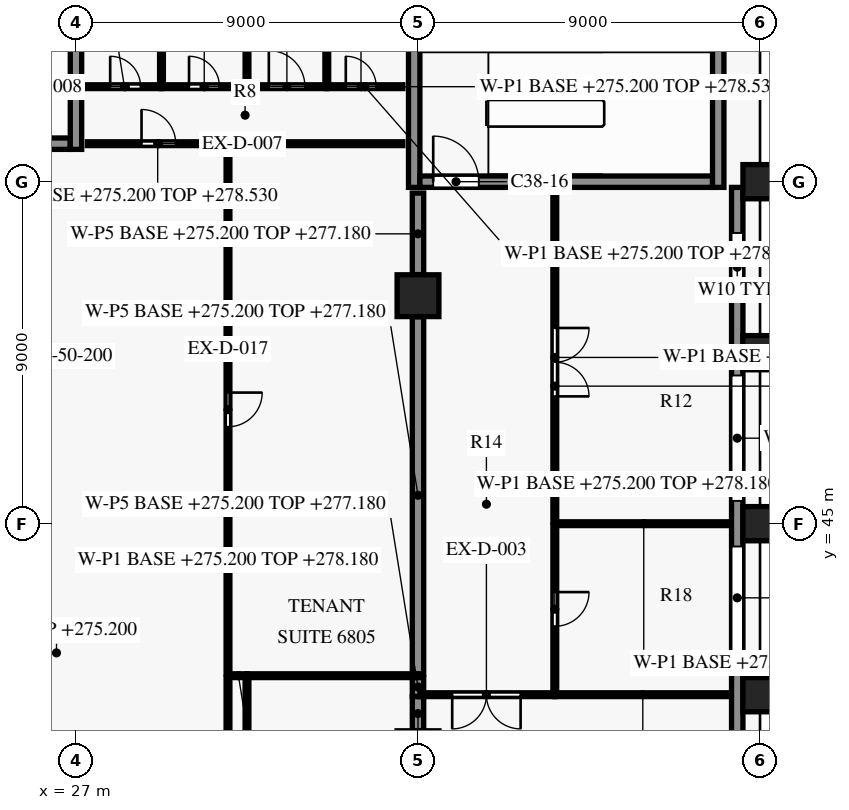
"""IFC4 building model, lengths in metres.
Left out: names, types, materials, properties, quantities, classifications, styles, units other than length and angle.
Written with IfcOpenShell. Run it as: python <this file> out.ifc"""

import sys

from ifc_helpers import new_model, si_unit, direction, frame, frame_2d, origin, origin_2d, place, context, subcontext, project, spatial, rectangle, extrude, element, fill, save


model = new_model("IFC4")
c1 = context("Model", 3, precision=1e-05, world=origin(), true_north=direction((0.0, 1.0)))
c2 = subcontext(c1, "Body", "Model", "MODEL_VIEW")
j1 = project(units=[si_unit("LENGTHUNIT", "METRE"), si_unit("PLANEANGLEUNIT", "RADIAN")], contexts=[c1])
p1 = place(None, origin())
s1 = spatial("IfcSite", under=j1, at=p1, CompositionType="ELEMENT")
p2 = place(p1, origin())
s2 = spatial("IfcBuilding", under=s1, at=p2, CompositionType="ELEMENT")
p3 = place(p2, frame((0.0, 0.0, 275.2)))
s3 = spatial("IfcBuildingStorey", under=s2, at=p3, CompositionType="ELEMENT", Elevation=275.2)
for number, where, z_axis, x_axis in (
    (1, (45.0, 40.5, 0.0), (0.0, 0.0, 1.0), (0.0, 1.0, 0.0)),
    (2, (45.0, 45.0, 0.0), (0.0, 0.0, 1.0), (0.0, 1.0, 0.0)),
    (3, (45.0, 49.5, 0.0), (0.0, 0.0, 1.0), (0.0, 1.0, 0.0)),
    (4, (45.0, 54.0, 0.0), (0.0, 0.0, 1.0), (0.0, 1.0, 0.0)),
):
    element("IfcColumn", number, at=place(p3, frame(where, z_axis=z_axis, x_axis=x_axis)), inside=s3, PredefinedType="COLUMN", context=c2, shape_type="SweptSolid", body=[
        extrude(rectangle(XDim=0.9, YDim=0.9, at=origin_2d()), origin(), (0.0, 0.0, 1.0), 3.8),
    ])
p4 = place(p3, frame((36.0, 51.0, 0.0), z_axis=(0.0, 0.0, 1.0), x_axis=(1.0, 0.0, 0.0)))
e5 = element("IfcColumn", 5, at=p4, inside=s3, PredefinedType="COLUMN", context=c2, shape_type="SweptSolid", body=[
    extrude(rectangle(XDim=1.1, YDim=1.1, at=origin_2d()), origin(), (0.0, 0.0, 1.0), 3.8),
])
p5 = place(p3, frame((44.4, 53.85, 0.0), z_axis=(0.0, 0.0, 1.0), x_axis=(0.0, -1.0, 0.0)))
e6 = element("IfcWall", 6, at=p5, inside=s3, PredefinedType="SOLIDWALL", context=c2, shape_type="SweptSolid", body=[
    extrude(rectangle(XDim=21.602, YDim=0.3, at=frame_2d((10.801, 0.0))), origin(), (0.0, 0.0, 1.0), 3.0),
])
p6 = place(p5, frame((1.2, 0.0, 0.75)))
e7 = element("IfcOpeningElement", 7, at=p6, cuts=e6, PredefinedType="OPENING", context=c2, shape_type="SweptSolid", body=[
    extrude(rectangle(XDim=1.8, YDim=1.8, at=frame_2d((0.9, 0.9))), frame((0.0, 0.16, 0.0), z_axis=(0.0, -1.0, 0.0), x_axis=(1.0, 0.0, 0.0)), (0.0, 0.0, 1.0), 0.32),
])
p7 = place(p5, frame((4.95, 0.0, 0.15)))
e8 = element("IfcOpeningElement", 8, at=p7, cuts=e6, PredefinedType="OPENING", context=c2, shape_type="SweptSolid", body=[
    extrude(rectangle(XDim=3.3, YDim=2.4, at=frame_2d((1.65, 1.2))), frame((0.0, 0.16, 0.0), z_axis=(0.0, -1.0, 0.0), x_axis=(1.0, 0.0, 0.0)), (0.0, 0.0, 1.0), 0.32),
])
p8 = place(p5, frame((9.45, 0.0, 0.15)))
e9 = element("IfcOpeningElement", 9, at=p8, cuts=e6, PredefinedType="OPENING", context=c2, shape_type="SweptSolid", body=[
    extrude(rectangle(XDim=3.3, YDim=2.4, at=frame_2d((1.65, 1.2))), frame((0.0, 0.16, 0.0), z_axis=(0.0, -1.0, 0.0), x_axis=(1.0, 0.0, 0.0)), (0.0, 0.0, 1.0), 0.32),
])
p9 = place(p5, frame((14.7, 0.0, 0.75)))
e10 = element("IfcOpeningElement", 10, at=p9, cuts=e6, PredefinedType="OPENING", context=c2, shape_type="SweptSolid", body=[
    extrude(rectangle(XDim=1.8, YDim=1.8, at=frame_2d((0.9, 0.9))), frame((0.0, 0.16, 0.0), z_axis=(0.0, -1.0, 0.0), x_axis=(1.0, 0.0, 0.0)), (0.0, 0.0, 1.0), 0.32),
])
p10 = place(p5, frame((19.2, 0.0, 0.75)))
e11 = element("IfcOpeningElement", 11, at=p10, cuts=e6, PredefinedType="OPENING", context=c2, shape_type="SweptSolid", body=[
    extrude(rectangle(XDim=1.8, YDim=1.8, at=frame_2d((0.9, 0.9))), frame((0.0, 0.16, 0.0), z_axis=(0.0, -1.0, 0.0), x_axis=(1.0, 0.0, 0.0)), (0.0, 0.0, 1.0), 0.32),
])
p11 = place(p3, frame((36.05, 54.0, 0.0), z_axis=(0.0, 0.0, 1.0), x_axis=(1.0, 0.0, 0.0)))
e12 = element("IfcWall", 12, at=p11, inside=s3, PredefinedType="SHEAR", context=c2, shape_type="SweptSolid", body=[
    extrude(rectangle(XDim=7.7, YDim=0.3, at=frame_2d((3.85, 0.0))), origin(), (0.0, 0.0, 1.0), 3.5),
])
p12 = place(p11, frame((0.35, 0.0, 0.0)))
e13 = element("IfcOpeningElement", 13, at=p12, cuts=e12, PredefinedType="OPENING", context=c2, shape_type="SweptSolid", body=[
    extrude(rectangle(XDim=1.2, YDim=2.2, at=frame_2d((0.6, 1.1))), frame((0.0, 0.16, 0.0), z_axis=(0.0, -1.0, 0.0), x_axis=(1.0, 0.0, 0.0)), (0.0, 0.0, 1.0), 0.32),
])
p13 = place(p3, frame((23.4, 55.0, 0.0), z_axis=(0.0, 0.0, 1.0), x_axis=(1.0, 0.0, 0.0)))
e14 = element("IfcWall", 14, at=p13, inside=s3, PredefinedType="SHEAR", context=c2, shape_type="SweptSolid", body=[
    extrude(rectangle(XDim=3.45, YDim=0.3, at=frame_2d((1.725, 0.0))), origin(), (0.0, 0.0, 1.0), 3.5),
])
p14 = place(p3, frame((27.0, 54.85, 0.0), z_axis=(0.0, 0.0, 1.0), x_axis=(0.0, 1.0, 0.0)))
e15 = element("IfcWall", 15, at=p14, inside=s3, PredefinedType="SHEAR", context=c2, shape_type="SweptSolid", body=[
    extrude(rectangle(XDim=8.6, YDim=0.3, at=frame_2d((4.3, 0.0))), origin(), (0.0, 0.0, 1.0), 3.5),
])
p15 = place(p14, frame((6.55, 0.0, 0.0)))
e16 = element("IfcOpeningElement", 16, at=p15, cuts=e15, PredefinedType="OPENING", context=c2, shape_type="SweptSolid", body=[
    extrude(rectangle(XDim=1.2, YDim=2.2, at=frame_2d((0.6, 1.1))), frame((0.0, 0.16, 0.0), z_axis=(0.0, -1.0, 0.0), x_axis=(1.0, 0.0, 0.0)), (0.0, 0.0, 1.0), 0.32),
])
for number, where, z_axis, x_axis in (
    (17, (35.9, 53.85, 0.0), (0.0, 0.0, 1.0), (0.0, 1.0, 0.0)),
    (18, (43.9, 53.85, 0.0), (0.0, 0.0, 1.0), (0.0, 1.0, 0.0)),
):
    element("IfcWall", number, at=place(p3, frame(where, z_axis=z_axis, x_axis=x_axis)), inside=s3, PredefinedType="SHEAR", context=c2, shape_type="SweptSolid", body=[
        extrude(rectangle(XDim=3.9, YDim=0.3, at=frame_2d((1.95, 0.0))), origin(), (0.0, 0.0, 1.0), 3.5),
    ])
p16 = place(p3, frame((36.0, 39.555, 0.0), z_axis=(0.0, 0.0, 1.0), x_axis=(0.0, 1.0, 0.0)))
e19 = element("IfcWall", 19, at=p16, inside=s3, PredefinedType="PARTITIONING", context=c2, shape_type="SweptSolid", body=[
    extrude(rectangle(XDim=0.895, YDim=0.3, at=frame_2d((0.448, 0.0))), origin(), (0.0, 0.0, 1.0), 1.98),
])
p17 = place(p3, frame((39.6, 40.5, 0.0), z_axis=(0.0, 0.0, 1.0), x_axis=(-1.0, 0.0, 0.0)))
e20 = element("IfcWall", 20, at=p17, inside=s3, PredefinedType="PARTITIONING", context=c2, shape_type="SweptSolid", body=[
    extrude(rectangle(XDim=3.55, YDim=0.1, at=frame_2d((1.775, 0.0))), origin(), (0.0, 0.0, 1.0), 1.98),
])
p18 = place(p17, frame((0.9, 0.0, 0.0)))
e21 = element("IfcOpeningElement", 21, at=p18, cuts=e20, PredefinedType="OPENING", context=c2, shape_type="SweptSolid", body=[
    extrude(rectangle(XDim=1.8, YDim=2.1, at=frame_2d((0.9, 1.05))), frame((0.0, 0.06, 0.0), z_axis=(0.0, -1.0, 0.0), x_axis=(1.0, 0.0, 0.0)), (0.0, 0.0, 1.0), 0.12),
])
p19 = place(p3, frame((44.23, 40.5, 0.0), z_axis=(0.0, 0.0, 1.0), x_axis=(-1.0, 0.0, 0.0)))
e22 = element("IfcWall", 22, at=p19, inside=s3, PredefinedType="PARTITIONING", context=c2, shape_type="SweptSolid", body=[
    extrude(rectangle(XDim=4.63, YDim=0.1, at=frame_2d((2.315, 0.0))), origin(), (0.0, 0.0, 1.0), 3.33),
])
p20 = place(p3, frame((36.0, 40.455, 0.0), z_axis=(0.0, 0.0, 1.0), x_axis=(0.0, 1.0, 0.0)))
e23 = element("IfcWall", 23, at=p20, inside=s3, PredefinedType="PARTITIONING", context=c2, shape_type="SweptSolid", body=[
    extrude(rectangle(XDim=0.495, YDim=0.3, at=frame_2d((0.248, 0.0))), origin(), (0.0, 0.0, 1.0), 1.98),
])
p21 = place(p3, frame((31.0, 40.95, 0.0), z_axis=(0.0, 0.0, 1.0), x_axis=(0.0, -1.0, 0.0)))
e24 = element("IfcWall", 24, at=p21, inside=s3, PredefinedType="PARTITIONING", context=c2, shape_type="SweptSolid", body=[
    extrude(rectangle(XDim=7.4, YDim=0.1, at=frame_2d((3.7, 0.0))), origin(), (0.0, 0.0, 1.0), 2.98),
])
p22 = place(p3, frame((31.5, 40.95, 0.0), z_axis=(0.0, 0.0, 1.0), x_axis=(0.0, -1.0, 0.0)))
e25 = element("IfcWall", 25, at=p22, inside=s3, PredefinedType="PARTITIONING", context=c2, shape_type="SweptSolid", body=[
    extrude(rectangle(XDim=13.78, YDim=0.1, at=frame_2d((6.89, 0.0))), origin(), (0.0, 0.0, 1.0), 1.98),
])
p23 = place(p22, frame((6.5, 0.0, 0.0)))
e26 = element("IfcOpeningElement", 26, at=p23, cuts=e25, PredefinedType="OPENING", context=c2, shape_type="SweptSolid", body=[
    extrude(rectangle(XDim=0.9, YDim=2.1, at=frame_2d((0.45, 1.05))), frame((0.0, 0.06, 0.0), z_axis=(0.0, -1.0, 0.0), x_axis=(1.0, 0.0, 0.0)), (0.0, 0.0, 1.0), 0.12),
])
p24 = place(p3, frame((31.05, 41.0, 0.0), z_axis=(0.0, 0.0, 1.0), x_axis=(1.0, 0.0, 0.0)))
e27 = element("IfcWall", 27, at=p24, inside=s3, PredefinedType="PARTITIONING", context=c2, shape_type="SweptSolid", body=[
    extrude(rectangle(XDim=0.45, YDim=0.1, at=frame_2d((0.225, 0.0))), origin(), (0.0, 0.0, 1.0), 3.33),
])
p25 = place(p3, frame((35.95, 41.0, 0.0), z_axis=(0.0, 0.0, 1.0), x_axis=(-1.0, 0.0, 0.0)))
e28 = element("IfcWall", 28, at=p25, inside=s3, PredefinedType="PARTITIONING", context=c2, shape_type="SweptSolid", body=[
    extrude(rectangle(XDim=4.45, YDim=0.1, at=frame_2d((2.225, 0.0))), origin(), (0.0, 0.0, 1.0), 1.98),
])
p26 = place(p3, frame((36.0, 41.05, 0.0), z_axis=(0.0, 0.0, 1.0), x_axis=(0.0, 1.0, 0.0)))
e29 = element("IfcWall", 29, at=p26, inside=s3, PredefinedType="PARTITIONING", context=c2, shape_type="SweptSolid", body=[
    extrude(rectangle(XDim=9.395, YDim=0.3, at=frame_2d((4.698, 0.0))), origin(), (0.0, 0.0, 1.0), 1.98),
])
p27 = place(p3, frame((39.6, 44.95, 0.0), z_axis=(0.0, 0.0, 1.0), x_axis=(0.0, -1.0, 0.0)))
e30 = element("IfcWall", 30, at=p27, inside=s3, PredefinedType="PARTITIONING", context=c2, shape_type="SweptSolid", body=[
    extrude(rectangle(XDim=4.4, YDim=0.1, at=frame_2d((2.2, 0.0))), origin(), (0.0, 0.0, 1.0), 2.98),
])
p28 = place(p27, frame((1.75, 0.0, 0.0)))
e31 = element("IfcOpeningElement", 31, at=p28, cuts=e30, PredefinedType="OPENING", context=c2, shape_type="SweptSolid", body=[
    extrude(rectangle(XDim=0.9, YDim=2.1, at=frame_2d((0.45, 1.05))), frame((0.0, 0.06, 0.0), z_axis=(0.0, -1.0, 0.0), x_axis=(1.0, 0.0, 0.0)), (0.0, 0.0, 1.0), 0.12),
])
p29 = place(p3, frame((39.65, 45.0, 0.0), z_axis=(0.0, 0.0, 1.0), x_axis=(1.0, 0.0, 0.0)))
e32 = element("IfcWall", 32, at=p29, inside=s3, PredefinedType="PARTITIONING", context=c2, shape_type="SweptSolid", body=[
    extrude(rectangle(XDim=4.58, YDim=0.1, at=frame_2d((2.29, 0.0))), origin(), (0.0, 0.0, 1.0), 2.98),
])
p30 = place(p3, frame((36.0, 51.555, 0.0), z_axis=(0.0, 0.0, 1.0), x_axis=(0.0, 1.0, 0.0)))
e33 = element("IfcWall", 33, at=p30, inside=s3, PredefinedType="PARTITIONING", context=c2, shape_type="SweptSolid", body=[
    extrude(rectangle(XDim=2.145, YDim=0.3, at=frame_2d((1.073, 0.0))), origin(), (0.0, 0.0, 1.0), 1.98),
])
p31 = place(p3, frame((39.6, 53.7, 0.0), z_axis=(0.0, 0.0, 1.0), x_axis=(0.0, -1.0, 0.0)))
e34 = element("IfcWall", 34, at=p31, inside=s3, PredefinedType="PARTITIONING", context=c2, shape_type="SweptSolid", body=[
    extrude(rectangle(XDim=8.65, YDim=0.1, at=frame_2d((4.325, 0.0))), origin(), (0.0, 0.0, 1.0), 2.73),
])
p32 = place(p31, frame((3.55, 0.0, 0.0)))
e35 = element("IfcOpeningElement", 35, at=p32, cuts=e34, PredefinedType="OPENING", context=c2, shape_type="SweptSolid", body=[
    extrude(rectangle(XDim=1.8, YDim=2.1, at=frame_2d((0.9, 1.05))), frame((0.0, 0.06, 0.0), z_axis=(0.0, -1.0, 0.0), x_axis=(1.0, 0.0, 0.0)), (0.0, 0.0, 1.0), 0.12),
])
p33 = place(p3, frame((31.0, 54.95, 0.0), z_axis=(0.0, 0.0, 1.0), x_axis=(0.0, -1.0, 0.0)))
e36 = element("IfcWall", 36, at=p33, inside=s3, PredefinedType="PARTITIONING", context=c2, shape_type="SweptSolid", body=[
    extrude(rectangle(XDim=13.9, YDim=0.1, at=frame_2d((6.95, 0.0))), origin(), (0.0, 0.0, 1.0), 2.98),
])
p34 = place(p33, frame((6.5, 0.0, 0.0)))
e37 = element("IfcOpeningElement", 37, at=p34, cuts=e36, PredefinedType="OPENING", context=c2, shape_type="SweptSolid", body=[
    extrude(rectangle(XDim=0.9, YDim=2.1, at=frame_2d((0.45, 1.05))), frame((0.0, 0.06, 0.0), z_axis=(0.0, -1.0, 0.0), x_axis=(1.0, 0.0, 0.0)), (0.0, 0.0, 1.0), 0.12),
])
p35 = place(p3, frame((27.3, 55.0, 0.0), z_axis=(0.0, 0.0, 1.0), x_axis=(1.0, 0.0, 0.0)))
e38 = element("IfcWall", 38, at=p35, inside=s3, PredefinedType="PARTITIONING", context=c2, shape_type="SweptSolid", body=[
    extrude(rectangle(XDim=3.7, YDim=0.1, at=frame_2d((1.85, 0.0))), origin(), (0.0, 0.0, 1.0), 3.33),
])
p36 = place(p35, frame((1.425, 0.0, 0.0)))
e39 = element("IfcOpeningElement", 39, at=p36, cuts=e38, PredefinedType="OPENING", context=c2, shape_type="SweptSolid", body=[
    extrude(rectangle(XDim=0.9, YDim=2.1, at=frame_2d((0.45, 1.05))), frame((0.0, 0.06, 0.0), z_axis=(0.0, -1.0, 0.0), x_axis=(1.0, 0.0, 0.0)), (0.0, 0.0, 1.0), 0.12),
])
p37 = place(p3, frame((35.6, 55.0, 0.0), z_axis=(0.0, 0.0, 1.0), x_axis=(-1.0, 0.0, 0.0)))
e40 = element("IfcWall", 40, at=p37, inside=s3, PredefinedType="PARTITIONING", context=c2, shape_type="SweptSolid", body=[
    extrude(rectangle(XDim=4.6, YDim=0.1, at=frame_2d((2.3, 0.0))), origin(), (0.0, 0.0, 1.0), 2.88),
])
p38 = place(p3, frame((27.3, 56.5, 0.0), z_axis=(0.0, 0.0, 1.0), x_axis=(1.0, 0.0, 0.0)))
e41 = element("IfcWall", 41, at=p38, inside=s3, PredefinedType="PARTITIONING", context=c2, shape_type="SweptSolid", body=[
    extrude(rectangle(XDim=1.95, YDim=0.1, at=frame_2d((0.975, 0.0))), origin(), (0.0, 0.0, 1.0), 3.33),
])
p39 = place(p38, frame((0.6, 0.0, 0.0)))
e42 = element("IfcOpeningElement", 42, at=p39, cuts=e41, PredefinedType="OPENING", context=c2, shape_type="SweptSolid", body=[
    extrude(rectangle(XDim=0.8, YDim=2.1, at=frame_2d((0.4, 1.05))), frame((0.0, 0.06, 0.0), z_axis=(0.0, -1.0, 0.0), x_axis=(1.0, 0.0, 0.0)), (0.0, 0.0, 1.0), 0.12),
])
p40 = place(p3, frame((29.25, 56.5, 0.0), z_axis=(0.0, 0.0, 1.0), x_axis=(1.0, 0.0, 0.0)))
e43 = element("IfcWall", 43, at=p40, inside=s3, PredefinedType="PARTITIONING", context=c2, shape_type="SweptSolid", body=[
    extrude(rectangle(XDim=2.25, YDim=0.1, at=frame_2d((1.125, 0.0))), origin(), (0.0, 0.0, 1.0), 3.33),
])
p41 = place(p40, frame((0.725, 0.0, 0.0)))
e44 = element("IfcOpeningElement", 44, at=p41, cuts=e43, PredefinedType="OPENING", context=c2, shape_type="SweptSolid", body=[
    extrude(rectangle(XDim=0.8, YDim=2.1, at=frame_2d((0.4, 1.05))), frame((0.0, 0.06, 0.0), z_axis=(0.0, -1.0, 0.0), x_axis=(1.0, 0.0, 0.0)), (0.0, 0.0, 1.0), 0.12),
])
p42 = place(p3, frame((31.5, 56.5, 0.0), z_axis=(0.0, 0.0, 1.0), x_axis=(1.0, 0.0, 0.0)))
e45 = element("IfcWall", 45, at=p42, inside=s3, PredefinedType="PARTITIONING", context=c2, shape_type="SweptSolid", body=[
    extrude(rectangle(XDim=2.1, YDim=0.1, at=frame_2d((1.05, 0.0))), origin(), (0.0, 0.0, 1.0), 3.33),
])
p43 = place(p42, frame((0.575, 0.0, 0.0)))
e46 = element("IfcOpeningElement", 46, at=p43, cuts=e45, PredefinedType="OPENING", context=c2, shape_type="SweptSolid", body=[
    extrude(rectangle(XDim=0.95, YDim=2.1, at=frame_2d((0.475, 1.05))), frame((0.0, 0.06, 0.0), z_axis=(0.0, -1.0, 0.0), x_axis=(1.0, 0.0, 0.0)), (0.0, 0.0, 1.0), 0.12),
])
p44 = place(p3, frame((33.6, 56.5, 0.0), z_axis=(0.0, 0.0, 1.0), x_axis=(1.0, 0.0, 0.0)))
e47 = element("IfcWall", 47, at=p44, inside=s3, PredefinedType="PARTITIONING", context=c2, shape_type="SweptSolid", body=[
    extrude(rectangle(XDim=2.0, YDim=0.1, at=frame_2d((1.0, 0.0))), origin(), (0.0, 0.0, 1.0), 2.88),
])
p45 = place(p44, frame((0.5, 0.0, 0.0)))
e48 = element("IfcOpeningElement", 48, at=p45, cuts=e47, PredefinedType="OPENING", context=c2, shape_type="SweptSolid", body=[
    extrude(rectangle(XDim=0.8, YDim=2.1, at=frame_2d((0.4, 1.05))), frame((0.0, 0.06, 0.0), z_axis=(0.0, -1.0, 0.0), x_axis=(1.0, 0.0, 0.0)), (0.0, 0.0, 1.0), 0.12),
])
p46 = place(p3, frame((29.25, 60.95, 0.0), z_axis=(0.0, 0.0, 1.0), x_axis=(0.0, -1.0, 0.0)))
e49 = element("IfcWall", 49, at=p46, inside=s3, PredefinedType="PARTITIONING", context=c2, shape_type="SweptSolid", body=[
    extrude(rectangle(XDim=4.4, YDim=0.1, at=frame_2d((2.2, 0.0))), origin(), (0.0, 0.0, 1.0), 3.33),
])
for number, where, z_axis, x_axis in (
    (50, (31.5, 60.95, 0.0), (0.0, 0.0, 1.0), (0.0, -1.0, 0.0)),
    (51, (33.6, 60.95, 0.0), (0.0, 0.0, 1.0), (0.0, -1.0, 0.0)),
):
    element("IfcWall", number, at=place(p3, frame(where, z_axis=z_axis, x_axis=x_axis)), inside=s3, PredefinedType="PARTITIONING", context=c2, shape_type="SweptSolid", body=[
        extrude(rectangle(XDim=4.4, YDim=0.1, at=frame_2d((2.2, 0.0))), origin(), (0.0, 0.0, 1.0), 1.98),
    ])
p47 = place(p6, origin())
e52 = element("IfcWindow", 52, at=p47, inside=s3, PartitioningType="SINGLE_PANEL", PredefinedType="WINDOW", context=c2, shape_type="SweptSolid", body=[
    extrude(rectangle(XDim=1.8, YDim=1.8, at=frame_2d((0.9, 0.9))), frame((0.0, 0.03, 0.0), z_axis=(0.0, -1.0, 0.0), x_axis=(1.0, 0.0, 0.0)), (0.0, 0.0, 1.0), 0.06),
])
fill(e7, e52)
p48 = place(p7, origin())
e53 = element("IfcWindow", 53, at=p48, inside=s3, PartitioningType="SINGLE_PANEL", PredefinedType="WINDOW", context=c2, shape_type="SweptSolid", body=[
    extrude(rectangle(XDim=3.3, YDim=2.4, at=frame_2d((1.65, 1.2))), frame((0.0, 0.03, 0.0), z_axis=(0.0, -1.0, 0.0), x_axis=(1.0, 0.0, 0.0)), (0.0, 0.0, 1.0), 0.06),
])
fill(e8, e53)
p49 = place(p8, origin())
e54 = element("IfcWindow", 54, at=p49, inside=s3, PartitioningType="SINGLE_PANEL", PredefinedType="WINDOW", context=c2, shape_type="SweptSolid", body=[
    extrude(rectangle(XDim=3.3, YDim=2.4, at=frame_2d((1.65, 1.2))), frame((0.0, 0.03, 0.0), z_axis=(0.0, -1.0, 0.0), x_axis=(1.0, 0.0, 0.0)), (0.0, 0.0, 1.0), 0.06),
])
fill(e9, e54)
p50 = place(p12, origin())
e55 = element("IfcDoor", 55, at=p50, inside=s3, OperationType="SINGLE_SWING_LEFT", PredefinedType="DOOR", context=c2, shape_type="SweptSolid", body=[
    extrude(rectangle(XDim=1.2, YDim=2.2, at=frame_2d((0.6, 1.1))), frame((0.0, 0.025, 0.0), z_axis=(0.0, -1.0, 0.0), x_axis=(1.0, 0.0, 0.0)), (0.0, 0.0, 1.0), 0.05),
])
fill(e13, e55)
p51 = place(p28, origin())
e56 = element("IfcDoor", 56, at=p51, inside=s3, OperationType="SINGLE_SWING_RIGHT", PredefinedType="DOOR", context=c2, shape_type="SweptSolid", body=[
    extrude(rectangle(XDim=0.9, YDim=2.1, at=frame_2d((0.45, 1.05))), frame((0.0, 0.025, 0.0), z_axis=(0.0, -1.0, 0.0), x_axis=(1.0, 0.0, 0.0)), (0.0, 0.0, 1.0), 0.05),
])
fill(e31, e56)
p52 = place(p32, origin())
e57 = element("IfcDoor", 57, at=p52, inside=s3, OperationType="DOUBLE_DOOR_SINGLE_SWING", PredefinedType="DOOR", context=c2, shape_type="SweptSolid", body=[
    extrude(rectangle(XDim=1.8, YDim=2.1, at=frame_2d((0.9, 1.05))), frame((0.0, 0.025, 0.0), z_axis=(0.0, -1.0, 0.0), x_axis=(1.0, 0.0, 0.0)), (0.0, 0.0, 1.0), 0.05),
])
fill(e35, e57)
p53 = place(p18, origin())
e58 = element("IfcDoor", 58, at=p53, inside=s3, OperationType="DOUBLE_DOOR_SINGLE_SWING", PredefinedType="DOOR", context=c2, shape_type="SweptSolid", body=[
    extrude(rectangle(XDim=1.8, YDim=2.1, at=frame_2d((0.9, 1.05))), frame((0.0, 0.025, 0.0), z_axis=(0.0, -1.0, 0.0), x_axis=(1.0, 0.0, 0.0)), (0.0, 0.0, 1.0), 0.05),
])
fill(e21, e58)
p54 = place(p36, origin())
e59 = element("IfcDoor", 59, at=p54, inside=s3, OperationType="SINGLE_SWING_RIGHT", PredefinedType="DOOR", context=c2, shape_type="SweptSolid", body=[
    extrude(rectangle(XDim=0.9, YDim=2.1, at=frame_2d((0.45, 1.05))), frame((0.0, 0.025, 0.0), z_axis=(0.0, -1.0, 0.0), x_axis=(1.0, 0.0, 0.0)), (0.0, 0.0, 1.0), 0.05),
])
fill(e39, e59)
p55 = place(p39, origin())
e60 = element("IfcDoor", 60, at=p55, inside=s3, OperationType="SINGLE_SWING_LEFT", PredefinedType="DOOR", context=c2, shape_type="SweptSolid", body=[
    extrude(rectangle(XDim=0.8, YDim=2.1, at=frame_2d((0.4, 1.05))), frame((0.0, 0.025, 0.0), z_axis=(0.0, -1.0, 0.0), x_axis=(1.0, 0.0, 0.0)), (0.0, 0.0, 1.0), 0.05),
])
fill(e42, e60)
p56 = place(p41, origin())
e61 = element("IfcDoor", 61, at=p56, inside=s3, OperationType="SINGLE_SWING_RIGHT", PredefinedType="DOOR", context=c2, shape_type="SweptSolid", body=[
    extrude(rectangle(XDim=0.8, YDim=2.1, at=frame_2d((0.4, 1.05))), frame((0.0, 0.025, 0.0), z_axis=(0.0, -1.0, 0.0), x_axis=(1.0, 0.0, 0.0)), (0.0, 0.0, 1.0), 0.05),
])
fill(e44, e61)
p57 = place(p43, origin())
e62 = element("IfcDoor", 62, at=p57, inside=s3, OperationType="SINGLE_SWING_LEFT", PredefinedType="DOOR", context=c2, shape_type="SweptSolid", body=[
    extrude(rectangle(XDim=0.95, YDim=2.1, at=frame_2d((0.475, 1.05))), frame((0.0, 0.025, 0.0), z_axis=(0.0, -1.0, 0.0), x_axis=(1.0, 0.0, 0.0)), (0.0, 0.0, 1.0), 0.05),
])
fill(e46, e62)
p58 = place(p45, origin())
e63 = element("IfcDoor", 63, at=p58, inside=s3, OperationType="SINGLE_SWING_LEFT", PredefinedType="DOOR", context=c2, shape_type="SweptSolid", body=[
    extrude(rectangle(XDim=0.8, YDim=2.1, at=frame_2d((0.4, 1.05))), frame((0.0, 0.025, 0.0), z_axis=(0.0, -1.0, 0.0), x_axis=(1.0, 0.0, 0.0)), (0.0, 0.0, 1.0), 0.05),
])
fill(e48, e63)
p59 = place(p34, origin())
e64 = element("IfcDoor", 64, at=p59, inside=s3, OperationType="SINGLE_SWING_LEFT", PredefinedType="DOOR", context=c2, shape_type="SweptSolid", body=[
    extrude(rectangle(XDim=0.9, YDim=2.1, at=frame_2d((0.45, 1.05))), frame((0.0, 0.025, 0.0), z_axis=(0.0, -1.0, 0.0), x_axis=(1.0, 0.0, 0.0)), (0.0, 0.0, 1.0), 0.05),
])
fill(e37, e64)
save(model, sys.argv[1])
